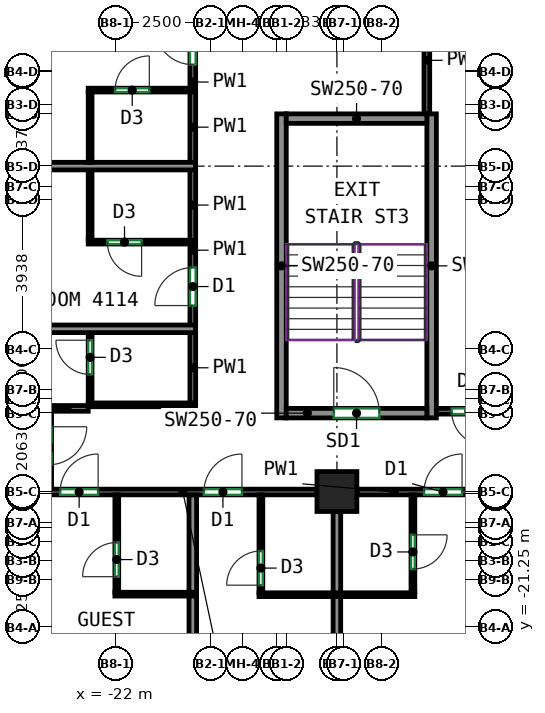
"""IFC4 building model, lengths in metres.
Left out: names, types, materials, properties, quantities, classifications, styles, units other than length and angle.
Written with IfcOpenShell. Run it as: python <this file> out.ifc"""

import sys

from ifc_helpers import new_model, si_unit, direction, frame, frame_2d, origin, origin_2d, place, context, subcontext, project, spatial, rectangle, extrude, source, transform, mapped, element, fill, save


model = new_model("IFC4")
c1 = context("Model", 3, precision=1e-05, world=origin(), true_north=direction((0.0, 1.0)))
c2 = subcontext(c1, "Body", "Model", "MODEL_VIEW")
j1 = project(units=[si_unit("LENGTHUNIT", "METRE"), si_unit("PLANEANGLEUNIT", "RADIAN")], contexts=[c1])
p1 = place(None, origin())
s1 = spatial("IfcSite", under=j1, at=p1, CompositionType="ELEMENT")
p2 = place(p1, origin())
s2 = spatial("IfcBuilding", under=s1, at=p2, CompositionType="ELEMENT")
p3 = place(p2, frame((0.0, 0.0, 175.3)))
s3 = spatial("IfcBuildingStorey", under=s2, at=p3, CompositionType="ELEMENT", Elevation=175.3)
m1 = source(origin(), c2, "Body", "SweptSolid", [
    extrude(rectangle(XDim=1.05, YDim=1.05, at=origin_2d()), origin(), (0.0, 0.0, 1.0), 3.12),
])
p4 = place(p3, frame((-16.167, -17.688, 0.0), z_axis=(0.0, 0.0, 1.0), x_axis=(1.0, 0.0, 0.0)))
e1 = element("IfcColumn", 1, at=p4, inside=s3, PredefinedType="COLUMN", context=c2, shape_type="MappedRepresentation", body=[
    mapped(m1, transform((0.0, 0.0, 0.0))),
])
m2 = source(origin(), c2, "Body", "SweptSolid", [
    extrude(rectangle(XDim=8.0, YDim=0.25, at=frame_2d((4.0, 0.0))), origin(), (0.0, 0.0, 1.0), 3.12),
])
for number, where, z_axis, x_axis in (
    (2, (-17.625, -15.75, 0.0), (0.0, 0.0, 1.0), (0.0, 1.0, 0.0)),
    (3, (-13.675, -15.75, 0.0), (0.0, 0.0, 1.0), (0.0, 1.0, 0.0)),
):
    element("IfcWall", number, at=place(p3, frame(where, z_axis=z_axis, x_axis=x_axis)), inside=s3, PredefinedType="SHEAR", context=c2, shape_type="MappedRepresentation", body=[
        mapped(m2, transform((0.0, 0.0, 0.0))),
    ])
m3 = source(origin(), c2, "Body", "SweptSolid", [
    extrude(rectangle(XDim=3.7, YDim=0.25, at=frame_2d((1.85, 0.0))), origin(), (0.0, 0.0, 1.0), 3.12),
])
p5 = place(p3, frame((-17.5, -15.625, 0.0), z_axis=(0.0, 0.0, 1.0), x_axis=(1.0, 0.0, 0.0)))
e4 = element("IfcWall", 4, at=p5, inside=s3, PredefinedType="SHEAR", context=c2, shape_type="MappedRepresentation", body=[
    mapped(m3, transform((0.0, 0.0, 0.0))),
])
p6 = place(p5, frame((1.25, 0.0, 0.0)))
e5 = element("IfcOpeningElement", 5, at=p6, cuts=e4, PredefinedType="OPENING", context=c2, shape_type="SweptSolid", body=[
    extrude(rectangle(XDim=1.2, YDim=2.1, at=frame_2d((0.6, 1.05))), frame((0.0, 0.135, 0.0), z_axis=(0.0, -1.0, 0.0), x_axis=(1.0, 0.0, 0.0)), (0.0, 0.0, 1.0), 0.27),
])
p7 = place(p3, frame((-17.5, -7.875, 0.0), z_axis=(0.0, 0.0, 1.0), x_axis=(1.0, 0.0, 0.0)))
e6 = element("IfcWall", 6, at=p7, inside=s3, PredefinedType="SHEAR", context=c2, shape_type="MappedRepresentation", body=[
    mapped(m3, transform((0.0, 0.0, 0.0))),
])
p8 = place(p3, frame((-23.75, -17.7, 0.0), z_axis=(0.0, 0.0, 1.0), x_axis=(1.0, 0.0, 0.0)))
e7 = element("IfcWall", 7, at=p8, inside=s3, PredefinedType="PARTITIONING", context=c2, shape_type="SweptSolid", body=[
    extrude(rectangle(XDim=7.058, YDim=0.15, at=frame_2d((3.529, 0.0))), origin(), (0.0, 0.0, 1.0), 2.52),
])
p9 = place(p8, frame((0.3, 0.0, 0.0)))
e8 = element("IfcOpeningElement", 8, at=p9, cuts=e7, PredefinedType="OPENING", context=c2, shape_type="SweptSolid", body=[
    extrude(rectangle(XDim=1.0, YDim=2.1, at=frame_2d((0.5, 1.05))), frame((0.0, 0.085, 0.0), z_axis=(0.0, -1.0, 0.0), x_axis=(1.0, 0.0, 0.0)), (0.0, 0.0, 1.0), 0.17),
])
p10 = place(p8, frame((4.084, 0.0, 0.0)))
e9 = element("IfcOpeningElement", 9, at=p10, cuts=e7, PredefinedType="OPENING", context=c2, shape_type="SweptSolid", body=[
    extrude(rectangle(XDim=1.0, YDim=2.1, at=frame_2d((0.5, 1.05))), frame((0.0, 0.085, 0.0), z_axis=(0.0, -1.0, 0.0), x_axis=(1.0, 0.0, 0.0)), (0.0, 0.0, 1.0), 0.17),
])
p11 = place(p3, frame((-15.642, -17.7, 0.0), z_axis=(0.0, 0.0, 1.0), x_axis=(1.0, 0.0, 0.0)))
e10 = element("IfcWall", 10, at=p11, inside=s3, PredefinedType="PARTITIONING", context=c2, shape_type="SweptSolid", body=[
    extrude(rectangle(XDim=6.534, YDim=0.15, at=frame_2d((3.267, 0.0))), origin(), (0.0, 0.0, 1.0), 3.12),
])
p12 = place(p11, frame((1.768, 0.0, 0.0)))
e11 = element("IfcOpeningElement", 11, at=p12, cuts=e10, PredefinedType="OPENING", context=c2, shape_type="SweptSolid", body=[
    extrude(rectangle(XDim=1.0, YDim=2.1, at=frame_2d((0.5, 1.05))), frame((0.0, 0.085, 0.0), z_axis=(0.0, -1.0, 0.0), x_axis=(1.0, 0.0, 0.0)), (0.0, 0.0, 1.0), 0.17),
])
p13 = place(p11, frame((3.56, 0.0, 0.0)))
e12 = element("IfcOpeningElement", 12, at=p13, cuts=e10, PredefinedType="OPENING", context=c2, shape_type="SweptSolid", body=[
    extrude(rectangle(XDim=1.0, YDim=2.1, at=frame_2d((0.5, 1.05))), frame((0.0, 0.085, 0.0), z_axis=(0.0, -1.0, 0.0), x_axis=(1.0, 0.0, 0.0)), (0.0, 0.0, 1.0), 0.17),
])
p14 = place(p3, frame((-23.825, -15.5, 0.0), z_axis=(0.0, 0.0, 1.0), x_axis=(1.0, 0.0, 0.0)))
e13 = element("IfcWall", 13, at=p14, inside=s3, PredefinedType="PARTITIONING", context=c2, shape_type="SweptSolid", body=[
    extrude(rectangle(XDim=1.114, YDim=0.15, at=frame_2d((0.557, 0.0))), origin(), (0.0, 0.0, 1.0), 3.12),
])
p15 = place(p3, frame((-19.959, -15.366, 0.0), z_axis=(0.0, 0.0, 1.0), x_axis=(0.0, 1.0, 0.0)))
e14 = element("IfcWall", 14, at=p15, inside=s3, PredefinedType="PARTITIONING", context=c2, shape_type="SweptSolid", body=[
    extrude(rectangle(XDim=1.87, YDim=0.15, at=frame_2d((0.935, 0.0))), origin(), (0.0, 0.0, 1.0), 3.12),
])
p16 = place(p3, frame((-19.959, -13.316, 0.0), z_axis=(0.0, 0.0, 1.0), x_axis=(0.0, 1.0, 0.0)))
e15 = element("IfcWall", 15, at=p16, inside=s3, PredefinedType="PARTITIONING", context=c2, shape_type="SweptSolid", body=[
    extrude(rectangle(XDim=2.151, YDim=0.15, at=frame_2d((1.075, 0.0))), origin(), (0.0, 0.0, 1.0), 3.12),
])
p17 = place(p16, frame((0.522, 0.0, 0.0)))
e16 = element("IfcOpeningElement", 16, at=p17, cuts=e15, PredefinedType="OPENING", context=c2, shape_type="SweptSolid", body=[
    extrude(rectangle(XDim=1.0, YDim=2.1, at=frame_2d((0.5, 1.05))), frame((0.0, 0.085, 0.0), z_axis=(0.0, -1.0, 0.0), x_axis=(1.0, 0.0, 0.0)), (0.0, 0.0, 1.0), 0.17),
])
p18 = place(p3, frame((-19.959, -11.085, 0.0), z_axis=(0.0, 0.0, 1.0), x_axis=(0.0, 1.0, 0.0)))
e17 = element("IfcWall", 17, at=p18, inside=s3, PredefinedType="PARTITIONING", context=c2, shape_type="SweptSolid", body=[
    extrude(rectangle(XDim=1.87, YDim=0.15, at=frame_2d((0.935, 0.0))), origin(), (0.0, 0.0, 1.0), 3.12),
])
p19 = place(p3, frame((-19.959, -7.085, 0.0), z_axis=(0.0, 0.0, 1.0), x_axis=(0.0, 1.0, 0.0)))
e18 = element("IfcWall", 18, at=p19, inside=s3, PredefinedType="PARTITIONING", context=c2, shape_type="SweptSolid", body=[
    extrude(rectangle(XDim=2.152, YDim=0.15, at=frame_2d((1.076, 0.0))), origin(), (0.0, 0.0, 1.0), 3.12),
])
p20 = place(p19, frame((0.63, 0.0, 0.0)))
e19 = element("IfcOpeningElement", 19, at=p20, cuts=e18, PredefinedType="OPENING", context=c2, shape_type="SweptSolid", body=[
    extrude(rectangle(XDim=1.0, YDim=2.1, at=frame_2d((0.5, 1.05))), frame((0.0, 0.085, 0.0), z_axis=(0.0, -1.0, 0.0), x_axis=(1.0, 0.0, 0.0)), (0.0, 0.0, 1.0), 0.17),
])
p21 = place(p3, frame((-19.959, -9.035, 0.0), z_axis=(0.0, 0.0, 1.0), x_axis=(0.0, 1.0, 0.0)))
e20 = element("IfcWall", 20, at=p21, inside=s3, PredefinedType="PARTITIONING", context=c2, shape_type="SweptSolid", body=[
    extrude(rectangle(XDim=1.87, YDim=0.15, at=frame_2d((0.935, 0.0))), origin(), (0.0, 0.0, 1.0), 3.12),
])
p22 = place(p3, frame((-13.8, -7.75, 0.0), z_axis=(0.0, 0.0, 1.0), x_axis=(0.0, 1.0, 0.0)))
e21 = element("IfcWall", 21, at=p22, inside=s3, PredefinedType="PARTITIONING", context=c2, shape_type="SweptSolid", body=[
    extrude(rectangle(XDim=2.817, YDim=0.15, at=frame_2d((1.408, 0.0))), origin(), (0.0, 0.0, 1.0), 3.12),
])
p23 = place(p3, frame((-8.573, -15.575, 0.0), z_axis=(0.0, 0.0, 1.0), x_axis=(-1.0, 0.0, 0.0)))
e22 = element("IfcWall", 22, at=p23, inside=s3, PredefinedType="PARTITIONING", context=c2, shape_type="SweptSolid", body=[
    extrude(rectangle(XDim=4.977, YDim=0.15, at=frame_2d((2.489, 0.0))), origin(), (0.0, 0.0, 1.0), 3.12),
])
p24 = place(p23, frame((3.673, 0.0, 0.0)))
e23 = element("IfcOpeningElement", 23, at=p24, cuts=e22, PredefinedType="OPENING", context=c2, shape_type="SweptSolid", body=[
    extrude(rectangle(XDim=0.9, YDim=2.1, at=frame_2d((0.45, 1.05))), frame((0.0, 0.085, 0.0), z_axis=(0.0, -1.0, 0.0), x_axis=(1.0, 0.0, 0.0)), (0.0, 0.0, 1.0), 0.17),
])
p25 = place(p3, frame((-21.959, -20.338, 0.0), z_axis=(0.0, 0.0, 1.0), x_axis=(0.0, 1.0, 0.0)))
e24 = element("IfcWall", 24, at=p25, inside=s3, PredefinedType="PARTITIONING", context=c2, shape_type="SweptSolid", body=[
    extrude(rectangle(XDim=2.561, YDim=0.1, at=frame_2d((1.28, 0.0))), origin(), (0.0, 0.0, 1.0), 3.12),
])
p26 = place(p25, frame((0.41, 0.0, 0.0)))
e25 = element("IfcOpeningElement", 25, at=p26, cuts=e24, PredefinedType="OPENING", context=c2, shape_type="SweptSolid", body=[
    extrude(rectangle(XDim=0.9, YDim=2.1, at=frame_2d((0.45, 1.05))), frame((0.0, 0.06, 0.0), z_axis=(0.0, -1.0, 0.0), x_axis=(1.0, 0.0, 0.0)), (0.0, 0.0, 1.0), 0.12),
])
p27 = place(p3, frame((-22.009, -20.388, 0.0), z_axis=(0.0, 0.0, 1.0), x_axis=(1.0, 0.0, 0.0)))
e26 = element("IfcWall", 26, at=p27, inside=s3, PredefinedType="PARTITIONING", context=c2, shape_type="SweptSolid", body=[
    extrude(rectangle(XDim=2.15, YDim=0.1, at=frame_2d((1.075, 0.0))), origin(), (0.0, 0.0, 1.0), 3.12),
])
p28 = place(p3, frame((-19.959, -26.0, 0.0), z_axis=(0.0, 0.0, 1.0), x_axis=(0.0, 1.0, 0.0)))
e27 = element("IfcWall", 27, at=p28, inside=s3, PredefinedType="PARTITIONING", context=c2, shape_type="SweptSolid", body=[
    extrude(rectangle(XDim=5.562, YDim=0.2, at=frame_2d((2.781, 0.0))), origin(), (0.0, 0.0, 1.0), 3.12),
])
p29 = place(p3, frame((-19.959, -20.338, 0.0), z_axis=(0.0, 0.0, 1.0), x_axis=(0.0, 1.0, 0.0)))
e28 = element("IfcWall", 28, at=p29, inside=s3, PredefinedType="PARTITIONING", context=c2, shape_type="SweptSolid", body=[
    extrude(rectangle(XDim=2.561, YDim=0.2, at=frame_2d((1.28, 0.0))), origin(), (0.0, 0.0, 1.0), 3.12),
])
p30 = place(p3, frame((-18.167, -20.352, 0.0), z_axis=(0.0, 0.0, 1.0), x_axis=(0.0, 1.0, 0.0)))
e29 = element("IfcWall", 29, at=p30, inside=s3, PredefinedType="PARTITIONING", context=c2, shape_type="SweptSolid", body=[
    extrude(rectangle(XDim=2.575, YDim=0.1, at=frame_2d((1.288, 0.0))), origin(), (0.0, 0.0, 1.0), 3.12),
])
p31 = place(p30, frame((0.2, 0.0, 0.0)))
e30 = element("IfcOpeningElement", 30, at=p31, cuts=e29, PredefinedType="OPENING", context=c2, shape_type="SweptSolid", body=[
    extrude(rectangle(XDim=0.9, YDim=2.1, at=frame_2d((0.45, 1.05))), frame((0.0, 0.06, 0.0), z_axis=(0.0, -1.0, 0.0), x_axis=(1.0, 0.0, 0.0)), (0.0, 0.0, 1.0), 0.12),
])
p32 = place(p3, frame((-18.217, -20.402, 0.0), z_axis=(0.0, 0.0, 1.0), x_axis=(1.0, 0.0, 0.0)))
e31 = element("IfcWall", 31, at=p32, inside=s3, PredefinedType="PARTITIONING", context=c2, shape_type="SweptSolid", body=[
    extrude(rectangle(XDim=4.1, YDim=0.1, at=frame_2d((2.05, 0.0))), origin(), (0.0, 0.0, 1.0), 3.12),
])
p33 = place(p3, frame((-16.167, -25.4, 0.0), z_axis=(0.0, 0.0, 1.0), x_axis=(0.0, 1.0, 0.0)))
e32 = element("IfcWall", 32, at=p33, inside=s3, PredefinedType="PARTITIONING", context=c2, shape_type="SweptSolid", body=[
    extrude(rectangle(XDim=4.948, YDim=0.2, at=frame_2d((2.474, 0.0))), origin(), (0.0, 0.0, 1.0), 3.12),
])
p34 = place(p3, frame((-16.167, -20.352, 0.0), z_axis=(0.0, 0.0, 1.0), x_axis=(0.0, 1.0, 0.0)))
e33 = element("IfcWall", 33, at=p34, inside=s3, PredefinedType="PARTITIONING", context=c2, shape_type="SweptSolid", body=[
    extrude(rectangle(XDim=2.14, YDim=0.2, at=frame_2d((1.07, 0.0))), origin(), (0.0, 0.0, 1.0), 3.12),
])
p35 = place(p3, frame((-14.167, -17.777, 0.0), z_axis=(0.0, 0.0, 1.0), x_axis=(0.0, -1.0, 0.0)))
e34 = element("IfcWall", 34, at=p35, inside=s3, PredefinedType="PARTITIONING", context=c2, shape_type="SweptSolid", body=[
    extrude(rectangle(XDim=2.575, YDim=0.1, at=frame_2d((1.288, 0.0))), origin(), (0.0, 0.0, 1.0), 3.12),
])
p36 = place(p35, frame((1.05, 0.0, 0.0)))
e35 = element("IfcOpeningElement", 35, at=p36, cuts=e34, PredefinedType="OPENING", context=c2, shape_type="SweptSolid", body=[
    extrude(rectangle(XDim=0.9, YDim=2.1, at=frame_2d((0.45, 1.05))), frame((0.0, 0.06, 0.0), z_axis=(0.0, -1.0, 0.0), x_axis=(1.0, 0.0, 0.0)), (0.0, 0.0, 1.0), 0.12),
])
p37 = place(p3, frame((-19.886, -15.406, 0.0), z_axis=(0.0, 0.0, 1.0), x_axis=(-1.0, 0.0, 0.0)))
e36 = element("IfcWall", 36, at=p37, inside=s3, PredefinedType="PARTITIONING", context=c2, shape_type="SweptSolid", body=[
    extrude(rectangle(XDim=2.825, YDim=0.1, at=frame_2d((1.413, 0.0))), origin(), (0.0, 0.0, 1.0), 3.12),
])
p38 = place(p3, frame((-22.661, -15.356, 0.0), z_axis=(0.0, 0.0, 1.0), x_axis=(0.0, 1.0, 0.0)))
e37 = element("IfcWall", 37, at=p38, inside=s3, PredefinedType="PARTITIONING", context=c2, shape_type="SweptSolid", body=[
    extrude(rectangle(XDim=1.85, YDim=0.1, at=frame_2d((0.925, 0.0))), origin(), (0.0, 0.0, 1.0), 3.12),
])
p39 = place(p38, frame((0.75, 0.0, 0.0)))
e38 = element("IfcOpeningElement", 38, at=p39, cuts=e37, PredefinedType="OPENING", context=c2, shape_type="SweptSolid", body=[
    extrude(rectangle(XDim=0.9, YDim=2.1, at=frame_2d((0.45, 1.05))), frame((0.0, 0.06, 0.0), z_axis=(0.0, -1.0, 0.0), x_axis=(1.0, 0.0, 0.0)), (0.0, 0.0, 1.0), 0.12),
])
p40 = place(p3, frame((-27.0, -13.406, 0.0), z_axis=(0.0, 0.0, 1.0), x_axis=(1.0, 0.0, 0.0)))
e39 = element("IfcWall", 39, at=p40, inside=s3, PredefinedType="PARTITIONING", context=c2, shape_type="SweptSolid", body=[
    extrude(rectangle(XDim=7.114, YDim=0.2, at=frame_2d((3.557, 0.0))), origin(), (0.0, 0.0, 1.0), 3.12),
])
p41 = place(p3, frame((-19.886, -11.125, 0.0), z_axis=(0.0, 0.0, 1.0), x_axis=(-1.0, 0.0, 0.0)))
e40 = element("IfcWall", 40, at=p41, inside=s3, PredefinedType="PARTITIONING", context=c2, shape_type="SweptSolid", body=[
    extrude(rectangle(XDim=2.825, YDim=0.1, at=frame_2d((1.413, 0.0))), origin(), (0.0, 0.0, 1.0), 3.12),
])
p42 = place(p41, frame((1.42, 0.0, 0.0)))
e41 = element("IfcOpeningElement", 41, at=p42, cuts=e40, PredefinedType="OPENING", context=c2, shape_type="SweptSolid", body=[
    extrude(rectangle(XDim=0.9, YDim=2.1, at=frame_2d((0.45, 1.05))), frame((0.0, 0.06, 0.0), z_axis=(0.0, -1.0, 0.0), x_axis=(1.0, 0.0, 0.0)), (0.0, 0.0, 1.0), 0.12),
])
p43 = place(p3, frame((-22.661, -11.075, 0.0), z_axis=(0.0, 0.0, 1.0), x_axis=(0.0, 1.0, 0.0)))
e42 = element("IfcWall", 42, at=p43, inside=s3, PredefinedType="PARTITIONING", context=c2, shape_type="SweptSolid", body=[
    extrude(rectangle(XDim=1.85, YDim=0.1, at=frame_2d((0.925, 0.0))), origin(), (0.0, 0.0, 1.0), 3.12),
])
p44 = place(p3, frame((-26.4, -9.125, 0.0), z_axis=(0.0, 0.0, 1.0), x_axis=(1.0, 0.0, 0.0)))
e43 = element("IfcWall", 43, at=p44, inside=s3, PredefinedType="PARTITIONING", context=c2, shape_type="SweptSolid", body=[
    extrude(rectangle(XDim=6.514, YDim=0.2, at=frame_2d((3.257, 0.0))), origin(), (0.0, 0.0, 1.0), 3.12),
])
p45 = place(p3, frame((-22.711, -7.125, 0.0), z_axis=(0.0, 0.0, 1.0), x_axis=(1.0, 0.0, 0.0)))
e44 = element("IfcWall", 44, at=p45, inside=s3, PredefinedType="PARTITIONING", context=c2, shape_type="SweptSolid", body=[
    extrude(rectangle(XDim=2.825, YDim=0.1, at=frame_2d((1.413, 0.0))), origin(), (0.0, 0.0, 1.0), 3.12),
])
p46 = place(p45, frame((0.708, 0.0, 0.0)))
e45 = element("IfcOpeningElement", 45, at=p46, cuts=e44, PredefinedType="OPENING", context=c2, shape_type="SweptSolid", body=[
    extrude(rectangle(XDim=0.9, YDim=2.1, at=frame_2d((0.45, 1.05))), frame((0.0, 0.06, 0.0), z_axis=(0.0, -1.0, 0.0), x_axis=(1.0, 0.0, 0.0)), (0.0, 0.0, 1.0), 0.12),
])
p47 = place(p3, frame((-22.661, -9.025, 0.0), z_axis=(0.0, 0.0, 1.0), x_axis=(0.0, 1.0, 0.0)))
e46 = element("IfcWall", 46, at=p47, inside=s3, PredefinedType="PARTITIONING", context=c2, shape_type="SweptSolid", body=[
    extrude(rectangle(XDim=1.85, YDim=0.1, at=frame_2d((0.925, 0.0))), origin(), (0.0, 0.0, 1.0), 3.12),
])
p48 = place(p6, origin())
e47 = element("IfcDoor", 47, at=p48, inside=s3, OperationType="DOUBLE_DOOR_SINGLE_SWING", PredefinedType="DOOR", context=c2, shape_type="SweptSolid", body=[
    extrude(rectangle(XDim=1.2, YDim=2.1, at=frame_2d((0.6, 1.05))), frame((0.0, 0.025, 0.0), z_axis=(0.0, -1.0, 0.0), x_axis=(1.0, 0.0, 0.0)), (0.0, 0.0, 1.0), 0.05),
])
fill(e5, e47)
p49 = place(p31, origin())
e48 = element("IfcDoor", 48, at=p49, inside=s3, OperationType="SINGLE_SWING_LEFT", PredefinedType="DOOR", context=c2, shape_type="SweptSolid", body=[
    extrude(rectangle(XDim=0.9, YDim=2.1, at=frame_2d((0.45, 1.05))), frame((0.0, 0.025, 0.0), z_axis=(0.0, -1.0, 0.0), x_axis=(1.0, 0.0, 0.0)), (0.0, 0.0, 1.0), 0.05),
])
fill(e30, e48)
p50 = place(p26, origin())
e49 = element("IfcDoor", 49, at=p50, inside=s3, OperationType="SINGLE_SWING_LEFT", PredefinedType="DOOR", context=c2, shape_type="SweptSolid", body=[
    extrude(rectangle(XDim=0.9, YDim=2.1, at=frame_2d((0.45, 1.05))), frame((0.0, 0.025, 0.0), z_axis=(0.0, -1.0, 0.0), x_axis=(1.0, 0.0, 0.0)), (0.0, 0.0, 1.0), 0.05),
])
fill(e25, e49)
p51 = place(p36, origin())
e50 = element("IfcDoor", 50, at=p51, inside=s3, OperationType="SINGLE_SWING_LEFT", PredefinedType="DOOR", context=c2, shape_type="SweptSolid", body=[
    extrude(rectangle(XDim=0.9, YDim=2.1, at=frame_2d((0.45, 1.05))), frame((0.0, 0.025, 0.0), z_axis=(0.0, -1.0, 0.0), x_axis=(1.0, 0.0, 0.0)), (0.0, 0.0, 1.0), 0.05),
])
fill(e35, e50)
p52 = place(p9, origin())
e51 = element("IfcDoor", 51, at=p52, inside=s3, OperationType="SINGLE_SWING_RIGHT", PredefinedType="DOOR", context=c2, shape_type="SweptSolid", body=[
    extrude(rectangle(XDim=1.0, YDim=2.1, at=frame_2d((0.5, 1.05))), frame((0.0, 0.025, 0.0), z_axis=(0.0, -1.0, 0.0), x_axis=(1.0, 0.0, 0.0)), (0.0, 0.0, 1.0), 0.05),
])
fill(e8, e51)
p53 = place(p10, origin())
e52 = element("IfcDoor", 52, at=p53, inside=s3, OperationType="SINGLE_SWING_RIGHT", PredefinedType="DOOR", context=c2, shape_type="SweptSolid", body=[
    extrude(rectangle(XDim=1.0, YDim=2.1, at=frame_2d((0.5, 1.05))), frame((0.0, 0.025, 0.0), z_axis=(0.0, -1.0, 0.0), x_axis=(1.0, 0.0, 0.0)), (0.0, 0.0, 1.0), 0.05),
])
fill(e9, e52)
p54 = place(p12, origin())
e53 = element("IfcDoor", 53, at=p54, inside=s3, OperationType="SINGLE_SWING_RIGHT", PredefinedType="DOOR", context=c2, shape_type="SweptSolid", body=[
    extrude(rectangle(XDim=1.0, YDim=2.1, at=frame_2d((0.5, 1.05))), frame((0.0, 0.025, 0.0), z_axis=(0.0, -1.0, 0.0), x_axis=(1.0, 0.0, 0.0)), (0.0, 0.0, 1.0), 0.05),
])
fill(e11, e53)
p55 = place(p24, origin())
e54 = element("IfcDoor", 54, at=p55, inside=s3, OperationType="SINGLE_SWING_LEFT", PredefinedType="DOOR", context=c2, shape_type="SweptSolid", body=[
    extrude(rectangle(XDim=0.9, YDim=2.1, at=frame_2d((0.45, 1.05))), frame((0.0, 0.025, 0.0), z_axis=(0.0, -1.0, 0.0), x_axis=(1.0, 0.0, 0.0)), (0.0, 0.0, 1.0), 0.05),
])
fill(e23, e54)
p56 = place(p39, origin())
e55 = element("IfcDoor", 55, at=p56, inside=s3, OperationType="SINGLE_SWING_RIGHT", PredefinedType="DOOR", context=c2, shape_type="SweptSolid", body=[
    extrude(rectangle(XDim=0.9, YDim=2.1, at=frame_2d((0.45, 1.05))), frame((0.0, 0.025, 0.0), z_axis=(0.0, -1.0, 0.0), x_axis=(1.0, 0.0, 0.0)), (0.0, 0.0, 1.0), 0.05),
])
fill(e38, e55)
p57 = place(p17, origin())
e56 = element("IfcDoor", 56, at=p57, inside=s3, OperationType="SINGLE_SWING_LEFT", PredefinedType="DOOR", context=c2, shape_type="SweptSolid", body=[
    extrude(rectangle(XDim=1.0, YDim=2.1, at=frame_2d((0.5, 1.05))), frame((0.0, 0.025, 0.0), z_axis=(0.0, -1.0, 0.0), x_axis=(1.0, 0.0, 0.0)), (0.0, 0.0, 1.0), 0.05),
])
fill(e16, e56)
p58 = place(p42, origin())
e57 = element("IfcDoor", 57, at=p58, inside=s3, OperationType="SINGLE_SWING_LEFT", PredefinedType="DOOR", context=c2, shape_type="SweptSolid", body=[
    extrude(rectangle(XDim=0.9, YDim=2.1, at=frame_2d((0.45, 1.05))), frame((0.0, 0.025, 0.0), z_axis=(0.0, -1.0, 0.0), x_axis=(1.0, 0.0, 0.0)), (0.0, 0.0, 1.0), 0.05),
])
fill(e41, e57)
p59 = place(p46, origin())
e58 = element("IfcDoor", 58, at=p59, inside=s3, OperationType="SINGLE_SWING_RIGHT", PredefinedType="DOOR", context=c2, shape_type="SweptSolid", body=[
    extrude(rectangle(XDim=0.9, YDim=2.1, at=frame_2d((0.45, 1.05))), frame((0.0, 0.025, 0.0), z_axis=(0.0, -1.0, 0.0), x_axis=(1.0, 0.0, 0.0)), (0.0, 0.0, 1.0), 0.05),
])
fill(e45, e58)
p60 = place(p20, origin())
e59 = element("IfcDoor", 59, at=p60, inside=s3, OperationType="SINGLE_SWING_RIGHT", PredefinedType="DOOR", context=c2, shape_type="SweptSolid", body=[
    extrude(rectangle(XDim=1.0, YDim=2.1, at=frame_2d((0.5, 1.05))), frame((0.0, 0.025, 0.0), z_axis=(0.0, -1.0, 0.0), x_axis=(1.0, 0.0, 0.0)), (0.0, 0.0, 1.0), 0.05),
])
fill(e19, e59)
save(model, sys.argv[1])
